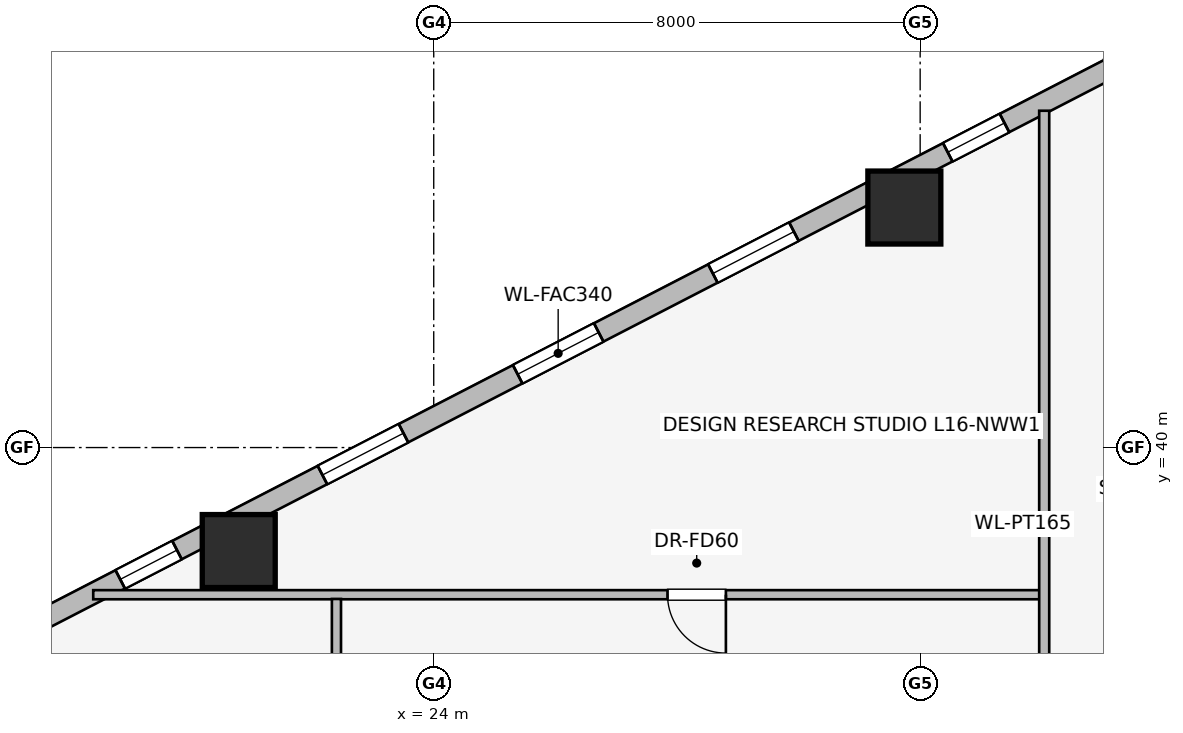
"""IFC4 building model, lengths in metres.
Left out: names, types, materials, properties, quantities, classifications, styles, units other than length and angle.
Written with IfcOpenShell. Run it as: python <this file> out.ifc"""

import sys

from ifc_helpers import new_model, si_unit, direction, frame, frame_2d, origin, origin_2d, place, context, subcontext, project, spatial, rectangle, extrude, element, fill, save


model = new_model("IFC4")
c1 = context("Model", 3, precision=1e-05, world=origin(), true_north=direction((0.0, 1.0)))
c2 = subcontext(c1, "Body", "Model", "MODEL_VIEW")
j1 = project(units=[si_unit("LENGTHUNIT", "METRE"), si_unit("PLANEANGLEUNIT", "RADIAN")], contexts=[c1])
p1 = place(None, origin())
s1 = spatial("IfcSite", under=j1, at=p1, CompositionType="ELEMENT")
p2 = place(p1, origin())
s2 = spatial("IfcBuilding", under=s1, at=p2, CompositionType="ELEMENT")
p3 = place(p2, frame((0.0, 0.0, 63.5)))
s3 = spatial("IfcBuildingStorey", under=s2, at=p3, CompositionType="ELEMENT", Elevation=63.5)
for number, where, z_axis, x_axis in (
    (1, (31.74, 43.947, 0.0), (0.0, 0.0, 1.0), (1.0, 0.0, 0.0)),
    (2, (20.793, 38.298, 0.0), (0.0, 0.0, 1.0), (1.0, 0.0, 0.0)),
):
    element("IfcColumn", number, at=place(p3, frame(where, z_axis=z_axis, x_axis=x_axis)), inside=s3, PredefinedType="COLUMN", context=c2, shape_type="SweptSolid", body=[
        extrude(rectangle(XDim=1.2, YDim=1.2, at=origin_2d()), origin(), (0.0, 0.0, 1.0), 3.65),
    ])
p4 = place(p3, frame((16.924, 36.841, 0.0), z_axis=(0.0, 0.0, 1.0), x_axis=(0.888634413993, 0.458616264721, 0.0)))
e3 = element("IfcWall", 3, at=p4, inside=s3, PredefinedType="STANDARD", context=c2, shape_type="SweptSolid", body=[
    extrude(rectangle(XDim=20.531, YDim=0.34, at=frame_2d((10.266, 0.0))), origin(), (0.0, 0.0, 1.0), 2.684),
])
p5 = place(p4, frame((2.161, 0.0, 0.75)))
e4 = element("IfcOpeningElement", 4, at=p5, cuts=e3, PredefinedType="OPENING", context=c2, shape_type="SweptSolid", body=[
    extrude(rectangle(XDim=1.05, YDim=1.4, at=frame_2d((0.525, 0.7))), frame((0.0, 0.18, 0.0), z_axis=(0.0, -1.0, 0.0), x_axis=(1.0, 0.0, 0.0)), (0.0, 0.0, 1.0), 0.36),
])
p6 = place(p4, frame((5.903, 0.0, 0.75)))
e5 = element("IfcOpeningElement", 5, at=p6, cuts=e3, PredefinedType="OPENING", context=c2, shape_type="SweptSolid", body=[
    extrude(rectangle(XDim=1.5, YDim=1.5, at=frame_2d((0.75, 0.75))), frame((0.0, 0.18, 0.0), z_axis=(0.0, -1.0, 0.0), x_axis=(1.0, 0.0, 0.0)), (0.0, 0.0, 1.0), 0.36),
])
p7 = place(p4, frame((9.516, 0.0, 0.75)))
e6 = element("IfcOpeningElement", 6, at=p7, cuts=e3, PredefinedType="OPENING", context=c2, shape_type="SweptSolid", body=[
    extrude(rectangle(XDim=1.5, YDim=1.5, at=frame_2d((0.75, 0.75))), frame((0.0, 0.18, 0.0), z_axis=(0.0, -1.0, 0.0), x_axis=(1.0, 0.0, 0.0)), (0.0, 0.0, 1.0), 0.36),
])
p8 = place(p4, frame((13.129, 0.0, 0.75)))
e7 = element("IfcOpeningElement", 7, at=p8, cuts=e3, PredefinedType="OPENING", context=c2, shape_type="SweptSolid", body=[
    extrude(rectangle(XDim=1.5, YDim=1.5, at=frame_2d((0.75, 0.75))), frame((0.0, 0.18, 0.0), z_axis=(0.0, -1.0, 0.0), x_axis=(1.0, 0.0, 0.0)), (0.0, 0.0, 1.0), 0.36),
])
p9 = place(p4, frame((17.476, 0.0, 0.75)))
e8 = element("IfcOpeningElement", 8, at=p9, cuts=e3, PredefinedType="OPENING", context=c2, shape_type="SweptSolid", body=[
    extrude(rectangle(XDim=1.05, YDim=1.4, at=frame_2d((0.525, 0.7))), frame((0.0, 0.18, 0.0), z_axis=(0.0, -1.0, 0.0), x_axis=(1.0, 0.0, 0.0)), (0.0, 0.0, 1.0), 0.36),
])
p10 = place(p3, frame((34.0, 37.58, 0.0), z_axis=(0.0, 0.0, 1.0), x_axis=(-1.0, 0.0, 0.0)))
e9 = element("IfcWall", 9, at=p10, inside=s3, PredefinedType="PARTITIONING", context=c2, shape_type="SweptSolid", body=[
    extrude(rectangle(XDim=15.6, YDim=0.15, at=frame_2d((7.8, 0.0))), origin(), (0.0, 0.0, 1.0), 3.39),
])
p11 = place(p10, frame((5.195, 0.0, 0.0)))
e10 = element("IfcOpeningElement", 10, at=p11, cuts=e9, PredefinedType="OPENING", context=c2, shape_type="SweptSolid", body=[
    extrude(rectangle(XDim=0.96, YDim=2.0, at=frame_2d((0.48, 1.0))), frame((0.0, 0.085, 0.0), z_axis=(0.0, -1.0, 0.0), x_axis=(1.0, 0.0, 0.0)), (0.0, 0.0, 1.0), 0.17),
])
p12 = place(p3, frame((34.04, 31.96, 0.0), z_axis=(0.0, 0.0, 1.0), x_axis=(0.0, 1.0, 0.0)))
e11 = element("IfcWall", 11, at=p12, inside=s3, PredefinedType="PARTITIONING", context=c2, shape_type="SweptSolid", body=[
    extrude(rectangle(XDim=13.579, YDim=0.165, at=frame_2d((6.79, 0.0))), origin(), (0.0, 0.0, 1.0), 3.39),
])
p13 = place(p3, frame((22.4, 36.08, 0.0), z_axis=(0.0, 0.0, 1.0), x_axis=(0.0, 1.0, 0.0)))
e12 = element("IfcWall", 12, at=p13, inside=s3, PredefinedType="PARTITIONING", context=c2, shape_type="SweptSolid", body=[
    extrude(rectangle(XDim=1.43, YDim=0.15, at=frame_2d((0.715, 0.0))), origin(), (0.0, 0.0, 1.0), 3.39),
])
p14 = place(p5, origin())
e13 = element("IfcWindow", 13, at=p14, inside=s3, PartitioningType="SINGLE_PANEL", PredefinedType="WINDOW", context=c2, shape_type="SweptSolid", body=[
    extrude(rectangle(XDim=1.05, YDim=1.4, at=frame_2d((0.525, 0.7))), frame((0.0, 0.03, 0.0), z_axis=(0.0, -1.0, 0.0), x_axis=(1.0, 0.0, 0.0)), (0.0, 0.0, 1.0), 0.06),
])
fill(e4, e13)
p15 = place(p6, origin())
e14 = element("IfcWindow", 14, at=p15, inside=s3, PartitioningType="SINGLE_PANEL", PredefinedType="WINDOW", context=c2, shape_type="SweptSolid", body=[
    extrude(rectangle(XDim=1.5, YDim=1.5, at=frame_2d((0.75, 0.75))), frame((0.0, 0.03, 0.0), z_axis=(0.0, -1.0, 0.0), x_axis=(1.0, 0.0, 0.0)), (0.0, 0.0, 1.0), 0.06),
])
fill(e5, e14)
p16 = place(p7, origin())
e15 = element("IfcWindow", 15, at=p16, inside=s3, PartitioningType="SINGLE_PANEL", PredefinedType="WINDOW", context=c2, shape_type="SweptSolid", body=[
    extrude(rectangle(XDim=1.5, YDim=1.5, at=frame_2d((0.75, 0.75))), frame((0.0, 0.03, 0.0), z_axis=(0.0, -1.0, 0.0), x_axis=(1.0, 0.0, 0.0)), (0.0, 0.0, 1.0), 0.06),
])
fill(e6, e15)
p17 = place(p8, origin())
e16 = element("IfcWindow", 16, at=p17, inside=s3, PartitioningType="SINGLE_PANEL", PredefinedType="WINDOW", context=c2, shape_type="SweptSolid", body=[
    extrude(rectangle(XDim=1.5, YDim=1.5, at=frame_2d((0.75, 0.75))), frame((0.0, 0.03, 0.0), z_axis=(0.0, -1.0, 0.0), x_axis=(1.0, 0.0, 0.0)), (0.0, 0.0, 1.0), 0.06),
])
fill(e7, e16)
p18 = place(p9, origin())
e17 = element("IfcWindow", 17, at=p18, inside=s3, PartitioningType="SINGLE_PANEL", PredefinedType="WINDOW", context=c2, shape_type="SweptSolid", body=[
    extrude(rectangle(XDim=1.05, YDim=1.4, at=frame_2d((0.525, 0.7))), frame((0.0, 0.03, 0.0), z_axis=(0.0, -1.0, 0.0), x_axis=(1.0, 0.0, 0.0)), (0.0, 0.0, 1.0), 0.06),
])
fill(e8, e17)
p19 = place(p11, origin())
e18 = element("IfcDoor", 18, at=p19, inside=s3, OperationType="SINGLE_SWING_LEFT", PredefinedType="DOOR", context=c2, shape_type="SweptSolid", body=[
    extrude(rectangle(XDim=0.96, YDim=2.0, at=frame_2d((0.48, 1.0))), frame((0.0, 0.025, 0.0), z_axis=(0.0, -1.0, 0.0), x_axis=(1.0, 0.0, 0.0)), (0.0, 0.0, 1.0), 0.05),
])
fill(e10, e18)
save(model, sys.argv[1])
